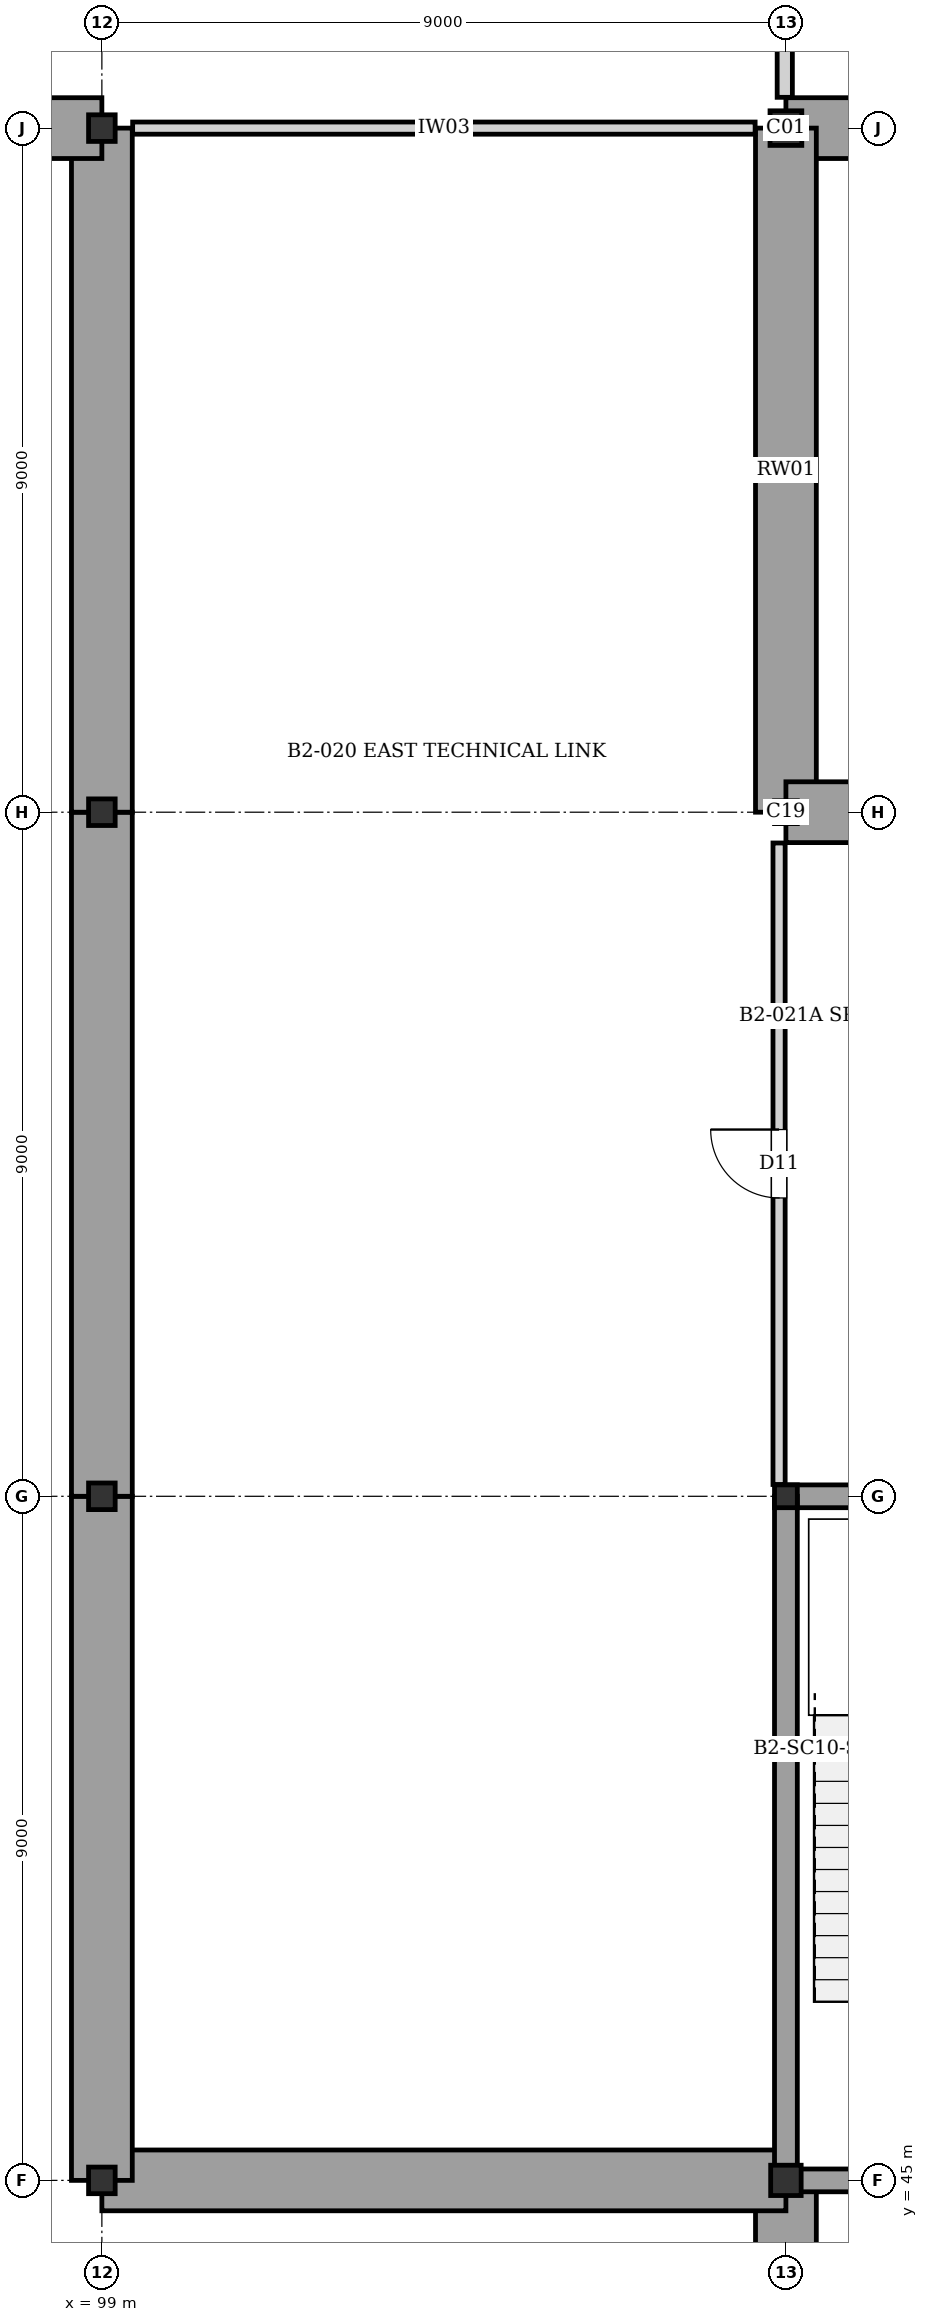
"""IFC4 building model, lengths in metres.
Left out: names, types, materials, properties, quantities, classifications, styles, units other than length and angle.
Written with IfcOpenShell. Run it as: python <this file> out.ifc"""

import sys

from ifc_helpers import new_model, si_unit, direction, frame, frame_2d, origin, origin_2d, place, context, subcontext, project, spatial, rectangle, hollow_rectangle, i_section, extrude, element, fill, save


model = new_model("IFC4")
c1 = context("Model", 3, precision=1e-05, world=origin(), true_north=direction((0.0, 1.0)))
c2 = subcontext(c1, "Body", "Model", "MODEL_VIEW")
j1 = project(units=[si_unit("LENGTHUNIT", "METRE"), si_unit("PLANEANGLEUNIT", "RADIAN")], contexts=[c1])
p1 = place(None, origin())
s1 = spatial("IfcSite", under=j1, at=p1, CompositionType="ELEMENT")
p2 = place(p1, origin())
s2 = spatial("IfcBuilding", under=s1, at=p2, CompositionType="ELEMENT")
p3 = place(p2, frame((0.0, 0.0, -8.96)))
s3 = spatial("IfcBuildingStorey", under=s2, at=p3, CompositionType="ELEMENT", Elevation=-8.96)
for number, where, z_axis, x_axis in (
    (1, (99.0, 45.0, 0.0), (0.0, 0.0, 1.0), (1.0, 0.0, 0.0)),
    (2, (99.0, 54.0, 0.0), (0.0, 0.0, 1.0), (1.0, 0.0, 0.0)),
    (3, (99.0, 63.0, 0.0), (0.0, 0.0, 1.0), (1.0, 0.0, 0.0)),
    (4, (99.0, 72.0, 0.0), (0.0, 0.0, 1.0), (1.0, 0.0, 0.0)),
):
    element("IfcColumn", number, at=place(p3, frame(where, z_axis=z_axis, x_axis=x_axis)), inside=s3, PredefinedType="COLUMN", context=c2, shape_type="SweptSolid", body=[
        extrude(hollow_rectangle(XDim=0.35, YDim=0.35, WallThickness=0.016, at=origin_2d()), origin(), (0.0, 0.0, 1.0), 4.48),
    ])
p4 = place(p3, frame((108.0, 45.0, 0.0), z_axis=(0.0, 0.0, 1.0), x_axis=(1.0, 0.0, 0.0)))
e5 = element("IfcColumn", 5, at=p4, inside=s3, PredefinedType="COLUMN", context=c2, shape_type="SweptSolid", body=[
    extrude(i_section(OverallWidth=0.401, OverallDepth=0.399, WebThickness=0.019, FlangeThickness=0.03, at=origin_2d()), origin(), (0.0, 0.0, 1.0), 4.48),
])
for number, where, z_axis, x_axis in (
    (6, (108.0, 54.0, 0.0), (0.0, 0.0, 1.0), (1.0, 0.0, 0.0)),
    (7, (108.0, 63.0, 0.0), (0.0, 0.0, 1.0), (1.0, 0.0, 0.0)),
):
    element("IfcColumn", number, at=place(p3, frame(where, z_axis=z_axis, x_axis=x_axis)), inside=s3, PredefinedType="COLUMN", context=c2, shape_type="SweptSolid", body=[
        extrude(hollow_rectangle(XDim=0.3, YDim=0.3, WallThickness=0.012, at=origin_2d()), origin(), (0.0, 0.0, 1.0), 4.48),
    ])
p5 = place(p3, frame((108.0, 72.0, 0.0), z_axis=(0.0, 0.0, 1.0), x_axis=(1.0, 0.0, 0.0)))
e8 = element("IfcColumn", 8, at=p5, inside=s3, PredefinedType="COLUMN", context=c2, shape_type="SweptSolid", body=[
    extrude(i_section(OverallWidth=0.418, OverallDepth=0.455, WebThickness=0.032, FlangeThickness=0.056, at=origin_2d()), origin(), (0.0, 0.0, 1.0), 4.48),
])
p6 = place(p3, frame((117.0, 72.0, 0.0), z_axis=(0.0, 0.0, 1.0), x_axis=(-1.0, 0.0, 0.0)))
e9 = element("IfcWall", 9, at=p6, inside=s3, PredefinedType="USERDEFINED", context=c2, shape_type="SweptSolid", body=[
    extrude(rectangle(XDim=9.0, YDim=0.8, at=frame_2d((4.5, 0.0))), origin(), (0.0, 0.0, 1.0), 4.2),
])
for number, where, z_axis, x_axis in (
    (10, (108.0, 72.0, 0.0), (0.0, 0.0, 1.0), (0.0, -1.0, 0.0)),
    (11, (108.0, 63.0, 0.0), (0.0, 0.0, 1.0), (1.0, 0.0, 0.0)),
):
    element("IfcWall", number, at=place(p3, frame(where, z_axis=z_axis, x_axis=x_axis)), inside=s3, PredefinedType="USERDEFINED", context=c2, shape_type="SweptSolid", body=[
        extrude(rectangle(XDim=9.0, YDim=0.8, at=frame_2d((4.5, 0.0))), origin(), (0.0, 0.0, 1.0), 4.03),
    ])
p7 = place(p3, frame((108.0, 36.0, 0.0), z_axis=(0.0, 0.0, 1.0), x_axis=(0.0, 1.0, 0.0)))
e12 = element("IfcWall", 12, at=p7, inside=s3, PredefinedType="USERDEFINED", context=c2, shape_type="SweptSolid", body=[
    extrude(rectangle(XDim=9.0, YDim=0.8, at=frame_2d((4.5, 0.0))), origin(), (0.0, 0.0, 1.0), 4.08),
])
for number, where, z_axis, x_axis in (
    (13, (108.0, 45.0, 0.0), (0.0, 0.0, 1.0), (-1.0, 0.0, 0.0)),
    (14, (99.0, 45.0, 0.0), (0.0, 0.0, 1.0), (0.0, 1.0, 0.0)),
    (15, (99.0, 54.0, 0.0), (0.0, 0.0, 1.0), (0.0, 1.0, 0.0)),
    (16, (99.0, 63.0, 0.0), (0.0, 0.0, 1.0), (0.0, 1.0, 0.0)),
    (17, (99.0, 72.0, 0.0), (0.0, 0.0, 1.0), (-1.0, 0.0, 0.0)),
):
    element("IfcWall", number, at=place(p3, frame(where, z_axis=z_axis, x_axis=x_axis)), inside=s3, PredefinedType="USERDEFINED", context=c2, shape_type="SweptSolid", body=[
        extrude(rectangle(XDim=9.0, YDim=0.8, at=frame_2d((4.5, 0.0))), origin(), (0.0, 0.0, 1.0), 4.03),
    ])
for number, where, z_axis, x_axis in (
    (18, (108.0, 45.0, 0.0), (0.0, 0.0, 1.0), (1.0, 0.0, 0.0)),
    (19, (108.0, 54.0, 0.0), (0.0, 0.0, 1.0), (1.0, 0.0, 0.0)),
    (20, (108.0, 45.0, 0.0), (0.0, 0.0, 1.0), (0.0, 1.0, 0.0)),
):
    element("IfcWall", number, at=place(p3, frame(where, z_axis=z_axis, x_axis=x_axis)), inside=s3, PredefinedType="SHEAR", context=c2, shape_type="SweptSolid", body=[
        extrude(rectangle(XDim=9.0, YDim=0.3, at=frame_2d((4.5, 0.0))), origin(), (0.0, 0.0, 1.0), 4.03),
    ])
p8 = place(p3, frame((99.405, 72.0, 0.0), z_axis=(0.0, 0.0, 1.0), x_axis=(1.0, 0.0, 0.0)))
e21 = element("IfcWall", 21, at=p8, inside=s3, PredefinedType="PARTITIONING", context=c2, shape_type="SweptSolid", body=[
    extrude(rectangle(XDim=8.19, YDim=0.16, at=frame_2d((4.095, 0.0))), origin(), (0.0, 0.0, 1.0), 3.13),
])
p9 = place(p3, frame((107.985, 72.405, 0.0), z_axis=(0.0, 0.0, 1.0), x_axis=(0.0, 1.0, 0.0)))
e22 = element("IfcWall", 22, at=p9, inside=s3, PredefinedType="PARTITIONING", context=c2, shape_type="SweptSolid", body=[
    extrude(rectangle(XDim=8.675, YDim=0.2, at=frame_2d((4.337, 0.0))), origin(), (0.0, 0.0, 1.0), 3.3),
])
p10 = place(p3, frame((107.91, 54.155, 0.0), z_axis=(0.0, 0.0, 1.0), x_axis=(0.0, 1.0, 0.0)))
e23 = element("IfcWall", 23, at=p10, inside=s3, PredefinedType="PARTITIONING", context=c2, shape_type="SweptSolid", body=[
    extrude(rectangle(XDim=8.44, YDim=0.16, at=frame_2d((4.22, 0.0))), origin(), (0.0, 0.0, 1.0), 3.13),
])
p11 = place(p10, frame((3.77, 0.0, 0.0)))
e24 = element("IfcOpeningElement", 24, at=p11, cuts=e23, PredefinedType="OPENING", context=c2, shape_type="SweptSolid", body=[
    extrude(rectangle(XDim=0.9, YDim=2.2, at=frame_2d((0.45, 1.1))), frame((0.0, 0.09, 0.0), z_axis=(0.0, -1.0, 0.0), x_axis=(1.0, 0.0, 0.0)), (0.0, 0.0, 1.0), 0.18),
])
p12 = place(p11, origin())
e25 = element("IfcDoor", 25, at=p12, inside=s3, OperationType="SINGLE_SWING_RIGHT", PredefinedType="DOOR", context=c2, shape_type="SweptSolid", body=[
    extrude(rectangle(XDim=0.9, YDim=2.2, at=frame_2d((0.45, 1.1))), frame((0.0, 0.025, 0.0), z_axis=(0.0, -1.0, 0.0), x_axis=(1.0, 0.0, 0.0)), (0.0, 0.0, 1.0), 0.05),
])
fill(e24, e25)
save(model, sys.argv[1])
